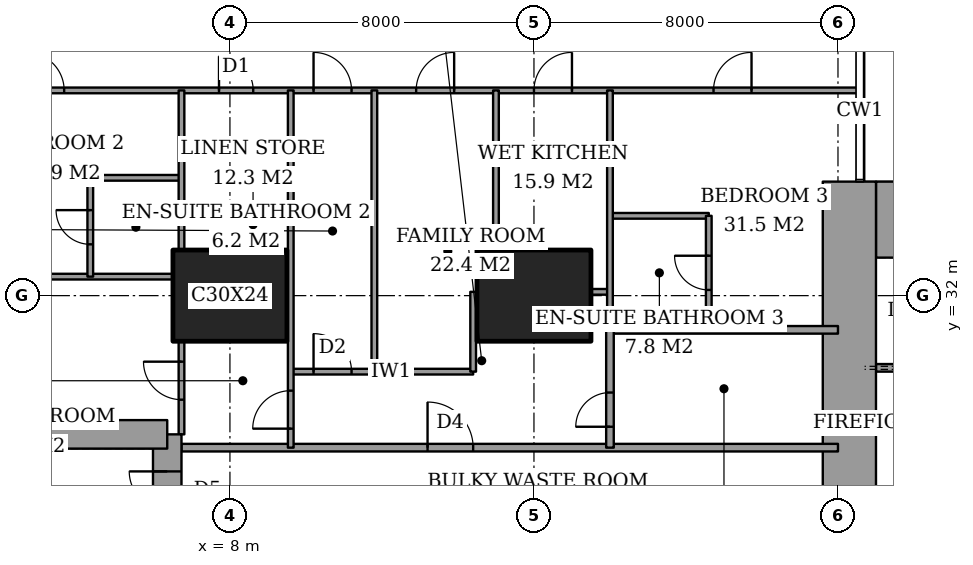
"""IFC4 building model, lengths in metres.
Left out: names, types, materials, properties, quantities, classifications, styles, units other than length and angle.
Written with IfcOpenShell. Run it as: python <this file> out.ifc"""

import sys

from ifc_helpers import new_model, si_unit, direction, frame, frame_2d, origin, origin_2d, place, context, subcontext, project, spatial, rectangle, extrude, element, fill, save


model = new_model("IFC4")
c1 = context("Model", 3, precision=1e-05, world=origin(), true_north=direction((0.0, 1.0)))
c2 = subcontext(c1, "Body", "Model", "MODEL_VIEW")
j1 = project(units=[si_unit("LENGTHUNIT", "METRE"), si_unit("PLANEANGLEUNIT", "RADIAN")], contexts=[c1])
p1 = place(None, origin())
s1 = spatial("IfcSite", under=j1, at=p1, CompositionType="ELEMENT")
p2 = place(p1, origin())
s2 = spatial("IfcBuilding", under=s1, at=p2, CompositionType="ELEMENT")
p3 = place(p2, frame((0.0, 0.0, 54.8)))
s3 = spatial("IfcBuildingStorey", under=s2, at=p3, CompositionType="ELEMENT", Elevation=54.8)
for number, where, z_axis, x_axis in (
    (1, (8.0, 32.0, 0.0), (0.0, 0.0, 1.0), (1.0, 0.0, 0.0)),
    (2, (16.0, 32.0, 0.0), (0.0, 0.0, 1.0), (1.0, 0.0, 0.0)),
):
    element("IfcColumn", number, at=place(p3, frame(where, z_axis=z_axis, x_axis=x_axis)), inside=s3, PredefinedType="COLUMN", context=c2, shape_type="SweptSolid", body=[
        extrude(rectangle(XDim=3.0, YDim=2.4, at=origin_2d()), origin(), (0.0, 0.0, 1.0), 3.6),
    ])
p4 = place(p3, frame((25.0, 34.0, 0.0), z_axis=(0.0, 0.0, 1.0), x_axis=(1.0, 0.0, 0.0)))
e3 = element("IfcWall", 3, at=p4, inside=s3, PredefinedType="SHEAR", context=c2, shape_type="SweptSolid", body=[
    extrude(rectangle(XDim=3.15, YDim=2.0, at=frame_2d((1.575, 0.0))), origin(), (0.0, 0.0, 1.0), 3.6),
])
p5 = place(p3, frame((24.3, 23.15, 0.0), z_axis=(0.0, 0.0, 1.0), x_axis=(0.0, 1.0, 0.0)))
e4 = element("IfcWall", 4, at=p5, inside=s3, PredefinedType="SHEAR", context=c2, shape_type="SweptSolid", body=[
    extrude(rectangle(XDim=11.85, YDim=1.4, at=frame_2d((5.925, 0.0))), origin(), (0.0, 0.0, 1.0), 3.6),
])
p6 = place(p5, frame((0.75, 0.0, 0.0)))
e5 = element("IfcOpeningElement", 5, at=p6, cuts=e4, PredefinedType="OPENING", context=c2, shape_type="SweptSolid", body=[
    extrude(rectangle(XDim=1.8, YDim=2.4, at=frame_2d((0.9, 1.2))), frame((0.0, 0.71, 0.0), z_axis=(0.0, -1.0, 0.0), x_axis=(1.0, 0.0, 0.0)), (0.0, 0.0, 1.0), 1.42),
])
p7 = place(p3, frame((6.35, 19.65, 0.0), z_axis=(0.0, 0.0, 1.0), x_axis=(0.0, 1.0, 0.0)))
e6 = element("IfcWall", 6, at=p7, inside=s3, PredefinedType="SHEAR", context=c2, shape_type="SweptSolid", body=[
    extrude(rectangle(XDim=8.7, YDim=0.75, at=frame_2d((4.35, 0.0))), origin(), (0.0, 0.0, 1.0), 3.6),
])
p8 = place(p7, frame((6.725, 0.0, 0.0)))
e7 = element("IfcOpeningElement", 7, at=p8, cuts=e6, PredefinedType="OPENING", context=c2, shape_type="SweptSolid", body=[
    extrude(rectangle(XDim=1.0, YDim=2.1, at=frame_2d((0.5, 1.05))), frame((0.0, 0.385, 0.0), z_axis=(0.0, -1.0, 0.0), x_axis=(1.0, 0.0, 0.0)), (0.0, 0.0, 1.0), 0.77),
])
p9 = place(p3, frame((6.35, 28.35, 0.0), z_axis=(0.0, 0.0, 1.0), x_axis=(-1.0, 0.0, 0.0)))
e8 = element("IfcWall", 8, at=p9, inside=s3, PredefinedType="SHEAR", context=c2, shape_type="SweptSolid", body=[
    extrude(rectangle(XDim=4.45, YDim=0.75, at=frame_2d((2.225, 0.0))), origin(), (0.0, 0.0, 1.0), 3.6),
])
p10 = place(p3, frame((6.725, 28.0, 0.0), z_axis=(0.0, 0.0, 1.0), x_axis=(1.0, 0.0, 0.0)))
e9 = element("IfcWall", 9, at=p10, inside=s3, PredefinedType="PARTITIONING", context=c2, shape_type="SweptSolid", body=[
    extrude(rectangle(XDim=17.275, YDim=0.2, at=frame_2d((8.637, 0.0))), origin(), (0.0, 0.0, 1.0), 3.35),
])
p11 = place(p10, frame((6.475, 0.0, 0.0)))
e10 = element("IfcOpeningElement", 10, at=p11, cuts=e9, PredefinedType="OPENING", context=c2, shape_type="SweptSolid", body=[
    extrude(rectangle(XDim=1.2, YDim=2.4, at=frame_2d((0.6, 1.2))), frame((0.0, 0.11, 0.0), z_axis=(0.0, -1.0, 0.0), x_axis=(1.0, 0.0, 0.0)), (0.0, 0.0, 1.0), 0.22),
])
p12 = place(p3, frame((9.6, 30.0, 0.0), z_axis=(0.0, 0.0, 1.0), x_axis=(1.0, 0.0, 0.0)))
e11 = element("IfcWall", 11, at=p12, inside=s3, PredefinedType="PARTITIONING", context=c2, shape_type="SweptSolid", body=[
    extrude(rectangle(XDim=4.8, YDim=0.15, at=frame_2d((2.4, 0.0))), origin(), (0.0, 0.0, 1.0), 3.35),
])
p13 = place(p12, frame((0.6, 0.0, 0.0)))
e12 = element("IfcOpeningElement", 12, at=p13, cuts=e11, PredefinedType="OPENING", context=c2, shape_type="SweptSolid", body=[
    extrude(rectangle(XDim=1.0, YDim=2.1, at=frame_2d((0.5, 1.05))), frame((0.0, 0.085, 0.0), z_axis=(0.0, -1.0, 0.0), x_axis=(1.0, 0.0, 0.0)), (0.0, 0.0, 1.0), 0.17),
])
p14 = place(p3, frame((18.0, 31.1, 0.0), z_axis=(0.0, 0.0, 1.0), x_axis=(1.0, 0.0, 0.0)))
e13 = element("IfcWall", 13, at=p14, inside=s3, PredefinedType="PARTITIONING", context=c2, shape_type="SweptSolid", body=[
    extrude(rectangle(XDim=6.0, YDim=0.2, at=frame_2d((3.0, 0.0))), origin(), (0.0, 0.0, 1.0), 3.35),
])
p15 = place(p3, frame((17.5, 32.1, 0.0), z_axis=(0.0, 0.0, 1.0), x_axis=(1.0, 0.0, 0.0)))
e14 = element("IfcWall", 14, at=p15, inside=s3, PredefinedType="PARTITIONING", context=c2, shape_type="SweptSolid", body=[
    extrude(rectangle(XDim=0.5, YDim=0.15, at=frame_2d((0.25, 0.0))), origin(), (0.0, 0.0, 1.0), 2.634),
])
p16 = place(p3, frame((1.35, 32.5, 0.0), z_axis=(0.0, 0.0, 1.0), x_axis=(1.0, 0.0, 0.0)))
e15 = element("IfcWall", 15, at=p16, inside=s3, PredefinedType="PARTITIONING", context=c2, shape_type="SweptSolid", body=[
    extrude(rectangle(XDim=5.15, YDim=0.15, at=frame_2d((2.575, 0.0))), origin(), (0.0, 0.0, 1.0), 3.35),
])
p17 = place(p3, frame((18.0, 34.1, 0.0), z_axis=(0.0, 0.0, 1.0), x_axis=(1.0, 0.0, 0.0)))
e16 = element("IfcWall", 16, at=p17, inside=s3, PredefinedType="PARTITIONING", context=c2, shape_type="SweptSolid", body=[
    extrude(rectangle(XDim=2.6, YDim=0.15, at=frame_2d((1.3, 0.0))), origin(), (0.0, 0.0, 1.0), 3.35),
])
p18 = place(p3, frame((4.325, 35.1, 0.0), z_axis=(0.0, 0.0, 1.0), x_axis=(1.0, 0.0, 0.0)))
e17 = element("IfcWall", 17, at=p18, inside=s3, PredefinedType="PARTITIONING", context=c2, shape_type="SweptSolid", body=[
    extrude(rectangle(XDim=2.4, YDim=0.15, at=frame_2d((1.2, 0.0))), origin(), (0.0, 0.0, 1.0), 3.35),
])
p19 = place(p3, frame((-0.45, 37.4, 0.0), z_axis=(0.0, 0.0, 1.0), x_axis=(1.0, 0.0, 0.0)))
e18 = element("IfcWall", 18, at=p19, inside=s3, PredefinedType="PARTITIONING", context=c2, shape_type="SweptSolid", body=[
    extrude(rectangle(XDim=25.011, YDim=0.15, at=frame_2d((12.505, 0.0))), origin(), (0.0, 0.0, 1.0), 3.35),
])
p20 = place(p19, frame((10.65, 0.0, 0.0)))
e19 = element("IfcOpeningElement", 19, at=p20, cuts=e18, PredefinedType="OPENING", context=c2, shape_type="SweptSolid", body=[
    extrude(rectangle(XDim=1.0, YDim=2.1, at=frame_2d((0.5, 1.05))), frame((0.0, 0.085, 0.0), z_axis=(0.0, -1.0, 0.0), x_axis=(1.0, 0.0, 0.0)), (0.0, 0.0, 1.0), 0.17),
])
p21 = place(p19, frame((3.087, 0.0, 0.0)))
e20 = element("IfcOpeningElement", 20, at=p21, cuts=e18, PredefinedType="OPENING", context=c2, shape_type="SweptSolid", body=[
    extrude(rectangle(XDim=1.0, YDim=2.1, at=frame_2d((0.5, 1.05))), frame((0.0, 0.085, 0.0), z_axis=(0.0, -1.0, 0.0), x_axis=(1.0, 0.0, 0.0)), (0.0, 0.0, 1.0), 0.17),
])
p22 = place(p19, frame((8.163, 0.0, 0.0)))
e21 = element("IfcOpeningElement", 21, at=p22, cuts=e18, PredefinedType="OPENING", context=c2, shape_type="SweptSolid", body=[
    extrude(rectangle(XDim=0.9, YDim=2.1, at=frame_2d((0.45, 1.05))), frame((0.0, 0.085, 0.0), z_axis=(0.0, -1.0, 0.0), x_axis=(1.0, 0.0, 0.0)), (0.0, 0.0, 1.0), 0.17),
])
p23 = place(p19, frame((13.35, 0.0, 0.0)))
e22 = element("IfcOpeningElement", 22, at=p23, cuts=e18, PredefinedType="OPENING", context=c2, shape_type="SweptSolid", body=[
    extrude(rectangle(XDim=1.0, YDim=2.1, at=frame_2d((0.5, 1.05))), frame((0.0, 0.085, 0.0), z_axis=(0.0, -1.0, 0.0), x_axis=(1.0, 0.0, 0.0)), (0.0, 0.0, 1.0), 0.17),
])
p24 = place(p19, frame((16.45, 0.0, 0.0)))
e23 = element("IfcOpeningElement", 23, at=p24, cuts=e18, PredefinedType="OPENING", context=c2, shape_type="SweptSolid", body=[
    extrude(rectangle(XDim=1.0, YDim=2.1, at=frame_2d((0.5, 1.05))), frame((0.0, 0.085, 0.0), z_axis=(0.0, -1.0, 0.0), x_axis=(1.0, 0.0, 0.0)), (0.0, 0.0, 1.0), 0.17),
])
p25 = place(p19, frame((21.175, 0.0, 0.0)))
e24 = element("IfcOpeningElement", 24, at=p25, cuts=e18, PredefinedType="OPENING", context=c2, shape_type="SweptSolid", body=[
    extrude(rectangle(XDim=1.0, YDim=2.1, at=frame_2d((0.5, 1.05))), frame((0.0, 0.085, 0.0), z_axis=(0.0, -1.0, 0.0), x_axis=(1.0, 0.0, 0.0)), (0.0, 0.0, 1.0), 0.17),
])
p26 = place(p3, frame((4.325, 32.5, 0.0), z_axis=(0.0, 0.0, 1.0), x_axis=(0.0, 1.0, 0.0)))
e25 = element("IfcWall", 25, at=p26, inside=s3, PredefinedType="PARTITIONING", context=c2, shape_type="SweptSolid", body=[
    extrude(rectangle(XDim=2.6, YDim=0.15, at=frame_2d((1.3, 0.0))), origin(), (0.0, 0.0, 1.0), 3.35),
])
p27 = place(p26, frame((0.85, 0.0, 0.0)))
e26 = element("IfcOpeningElement", 26, at=p27, cuts=e25, PredefinedType="OPENING", context=c2, shape_type="SweptSolid", body=[
    extrude(rectangle(XDim=0.9, YDim=2.1, at=frame_2d((0.45, 1.05))), frame((0.0, 0.085, 0.0), z_axis=(0.0, -1.0, 0.0), x_axis=(1.0, 0.0, 0.0)), (0.0, 0.0, 1.0), 0.17),
])
p28 = place(p3, frame((6.725, 28.35, 0.0), z_axis=(0.0, 0.0, 1.0), x_axis=(0.0, 1.0, 0.0)))
e27 = element("IfcWall", 27, at=p28, inside=s3, PredefinedType="PARTITIONING", context=c2, shape_type="SweptSolid", body=[
    extrude(rectangle(XDim=2.45, YDim=0.15, at=frame_2d((1.225, 0.0))), origin(), (0.0, 0.0, 1.0), 3.35),
])
p29 = place(p28, frame((0.913, 0.0, 0.0)))
e28 = element("IfcOpeningElement", 28, at=p29, cuts=e27, PredefinedType="OPENING", context=c2, shape_type="SweptSolid", body=[
    extrude(rectangle(XDim=1.0, YDim=2.1, at=frame_2d((0.5, 1.05))), frame((0.0, 0.085, 0.0), z_axis=(0.0, -1.0, 0.0), x_axis=(1.0, 0.0, 0.0)), (0.0, 0.0, 1.0), 0.17),
])
p30 = place(p3, frame((6.725, 33.2, 0.0), z_axis=(0.0, 0.0, 1.0), x_axis=(0.0, 1.0, 0.0)))
e29 = element("IfcWall", 29, at=p30, inside=s3, PredefinedType="PARTITIONING", context=c2, shape_type="SweptSolid", body=[
    extrude(rectangle(XDim=4.2, YDim=0.15, at=frame_2d((2.1, 0.0))), origin(), (0.0, 0.0, 1.0), 3.35),
])
p31 = place(p3, frame((9.6, 28.0, 0.0), z_axis=(0.0, 0.0, 1.0), x_axis=(0.0, 1.0, 0.0)))
e30 = element("IfcWall", 30, at=p31, inside=s3, PredefinedType="PARTITIONING", context=c2, shape_type="SweptSolid", body=[
    extrude(rectangle(XDim=9.4, YDim=0.15, at=frame_2d((4.7, 0.0))), origin(), (0.0, 0.0, 1.0), 3.35),
])
p32 = place(p31, frame((0.5, 0.0, 0.0)))
e31 = element("IfcOpeningElement", 31, at=p32, cuts=e30, PredefinedType="OPENING", context=c2, shape_type="SweptSolid", body=[
    extrude(rectangle(XDim=1.0, YDim=2.1, at=frame_2d((0.5, 1.05))), frame((0.0, 0.085, 0.0), z_axis=(0.0, -1.0, 0.0), x_axis=(1.0, 0.0, 0.0)), (0.0, 0.0, 1.0), 0.17),
])
p33 = place(p3, frame((11.8, 30.0, 0.0), z_axis=(0.0, 0.0, 1.0), x_axis=(0.0, 1.0, 0.0)))
e32 = element("IfcWall", 32, at=p33, inside=s3, PredefinedType="PARTITIONING", context=c2, shape_type="SweptSolid", body=[
    extrude(rectangle(XDim=7.4, YDim=0.15, at=frame_2d((3.7, 0.0))), origin(), (0.0, 0.0, 1.0), 3.35),
])
p34 = place(p3, frame((14.4, 30.0, 0.0), z_axis=(0.0, 0.0, 1.0), x_axis=(0.0, 1.0, 0.0)))
e33 = element("IfcWall", 33, at=p34, inside=s3, PredefinedType="PARTITIONING", context=c2, shape_type="SweptSolid", body=[
    extrude(rectangle(XDim=2.1, YDim=0.15, at=frame_2d((1.05, 0.0))), origin(), (0.0, 0.0, 1.0), 3.35),
])
p35 = place(p3, frame((15.0, 33.2, 0.0), z_axis=(0.0, 0.0, 1.0), x_axis=(0.0, 1.0, 0.0)))
e34 = element("IfcWall", 34, at=p35, inside=s3, PredefinedType="PARTITIONING", context=c2, shape_type="SweptSolid", body=[
    extrude(rectangle(XDim=4.2, YDim=0.15, at=frame_2d((2.1, 0.0))), origin(), (0.0, 0.0, 1.0), 3.35),
])
p36 = place(p3, frame((18.0, 28.0, 0.0), z_axis=(0.0, 0.0, 1.0), x_axis=(0.0, 1.0, 0.0)))
e35 = element("IfcWall", 35, at=p36, inside=s3, PredefinedType="PARTITIONING", context=c2, shape_type="SweptSolid", body=[
    extrude(rectangle(XDim=3.1, YDim=0.2, at=frame_2d((1.55, 0.0))), origin(), (0.0, 0.0, 1.0), 3.35),
])
p37 = place(p36, frame((0.55, 0.0, 0.0)))
e36 = element("IfcOpeningElement", 36, at=p37, cuts=e35, PredefinedType="OPENING", context=c2, shape_type="SweptSolid", body=[
    extrude(rectangle(XDim=0.9, YDim=2.1, at=frame_2d((0.45, 1.05))), frame((0.0, 0.11, 0.0), z_axis=(0.0, -1.0, 0.0), x_axis=(1.0, 0.0, 0.0)), (0.0, 0.0, 1.0), 0.22),
])
p38 = place(p3, frame((18.0, 31.1, 0.0), z_axis=(0.0, 0.0, 1.0), x_axis=(0.0, 1.0, 0.0)))
e37 = element("IfcWall", 37, at=p38, inside=s3, PredefinedType="PARTITIONING", context=c2, shape_type="SweptSolid", body=[
    extrude(rectangle(XDim=6.3, YDim=0.15, at=frame_2d((3.15, 0.0))), origin(), (0.0, 0.0, 1.0), 3.35),
])
p39 = place(p3, frame((20.6, 31.1, 0.0), z_axis=(0.0, 0.0, 1.0), x_axis=(0.0, 1.0, 0.0)))
e38 = element("IfcWall", 38, at=p39, inside=s3, PredefinedType="PARTITIONING", context=c2, shape_type="SweptSolid", body=[
    extrude(rectangle(XDim=3.0, YDim=0.15, at=frame_2d((1.5, 0.0))), origin(), (0.0, 0.0, 1.0), 3.35),
])
p40 = place(p39, frame((1.05, 0.0, 0.0)))
e39 = element("IfcOpeningElement", 39, at=p40, cuts=e38, PredefinedType="OPENING", context=c2, shape_type="SweptSolid", body=[
    extrude(rectangle(XDim=0.9, YDim=2.1, at=frame_2d((0.45, 1.05))), frame((0.0, 0.085, 0.0), z_axis=(0.0, -1.0, 0.0), x_axis=(1.0, 0.0, 0.0)), (0.0, 0.0, 1.0), 0.17),
])
p41 = place(p3, frame((25.0, 30.1, 0.0), z_axis=(0.0, 0.0, 1.0), x_axis=(1.0, 0.0, 0.0)))
e40 = element("IfcWall", 40, at=p41, inside=s3, PredefinedType="PARTITIONING", context=c2, shape_type="SweptSolid", body=[
    extrude(rectangle(XDim=12.7, YDim=0.2, at=frame_2d((6.35, 0.0))), origin(), (0.0, 0.0, 1.0), 3.6),
])
p42 = place(p41, frame((0.9, 0.0, 0.0)))
e41 = element("IfcOpeningElement", 41, at=p42, cuts=e40, PredefinedType="OPENING", context=c2, shape_type="SweptSolid", body=[
    extrude(rectangle(XDim=1.2, YDim=2.1, at=frame_2d((0.6, 1.05))), frame((0.0, 0.11, 0.0), z_axis=(0.0, -1.0, 0.0), x_axis=(1.0, 0.0, 0.0)), (0.0, 0.0, 1.0), 0.22),
])
p43 = place(p20, origin())
e42 = element("IfcDoor", 42, at=p43, inside=s3, OperationType="SINGLE_SWING_RIGHT", PredefinedType="DOOR", context=c2, shape_type="SweptSolid", body=[
    extrude(rectangle(XDim=1.0, YDim=2.1, at=frame_2d((0.5, 1.05))), frame((0.0, 0.025, 0.0), z_axis=(0.0, -1.0, 0.0), x_axis=(1.0, 0.0, 0.0)), (0.0, 0.0, 1.0), 0.05),
])
fill(e19, e42)
p44 = place(p27, origin())
e43 = element("IfcDoor", 43, at=p44, inside=s3, OperationType="SINGLE_SWING_LEFT", PredefinedType="DOOR", context=c2, shape_type="SweptSolid", body=[
    extrude(rectangle(XDim=0.9, YDim=2.1, at=frame_2d((0.45, 1.05))), frame((0.0, 0.025, 0.0), z_axis=(0.0, -1.0, 0.0), x_axis=(1.0, 0.0, 0.0)), (0.0, 0.0, 1.0), 0.05),
])
fill(e26, e43)
p45 = place(p21, origin())
e44 = element("IfcDoor", 44, at=p45, inside=s3, OperationType="SINGLE_SWING_RIGHT", PredefinedType="DOOR", context=c2, shape_type="SweptSolid", body=[
    extrude(rectangle(XDim=1.0, YDim=2.1, at=frame_2d((0.5, 1.05))), frame((0.0, 0.025, 0.0), z_axis=(0.0, -1.0, 0.0), x_axis=(1.0, 0.0, 0.0)), (0.0, 0.0, 1.0), 0.05),
])
fill(e20, e44)
p46 = place(p29, origin())
e45 = element("IfcDoor", 45, at=p46, inside=s3, OperationType="SINGLE_SWING_LEFT", PredefinedType="DOOR", context=c2, shape_type="SweptSolid", body=[
    extrude(rectangle(XDim=1.0, YDim=2.1, at=frame_2d((0.5, 1.05))), frame((0.0, 0.025, 0.0), z_axis=(0.0, -1.0, 0.0), x_axis=(1.0, 0.0, 0.0)), (0.0, 0.0, 1.0), 0.05),
])
fill(e28, e45)
p47 = place(p22, origin())
e46 = element("IfcDoor", 46, at=p47, inside=s3, OperationType="SINGLE_SWING_RIGHT", PredefinedType="DOOR", context=c2, shape_type="SweptSolid", body=[
    extrude(rectangle(XDim=0.9, YDim=2.1, at=frame_2d((0.45, 1.05))), frame((0.0, 0.025, 0.0), z_axis=(0.0, -1.0, 0.0), x_axis=(1.0, 0.0, 0.0)), (0.0, 0.0, 1.0), 0.05),
])
fill(e21, e46)
p48 = place(p32, origin())
e47 = element("IfcDoor", 47, at=p48, inside=s3, OperationType="SINGLE_SWING_RIGHT", PredefinedType="DOOR", context=c2, shape_type="SweptSolid", body=[
    extrude(rectangle(XDim=1.0, YDim=2.1, at=frame_2d((0.5, 1.05))), frame((0.0, 0.025, 0.0), z_axis=(0.0, -1.0, 0.0), x_axis=(1.0, 0.0, 0.0)), (0.0, 0.0, 1.0), 0.05),
])
fill(e31, e47)
p49 = place(p11, origin())
e48 = element("IfcDoor", 48, at=p49, inside=s3, OperationType="SINGLE_SWING_RIGHT", PredefinedType="DOOR", context=c2, shape_type="SweptSolid", body=[
    extrude(rectangle(XDim=1.2, YDim=2.4, at=frame_2d((0.6, 1.2))), frame((0.0, 0.025, 0.0), z_axis=(0.0, -1.0, 0.0), x_axis=(1.0, 0.0, 0.0)), (0.0, 0.0, 1.0), 0.05),
])
fill(e10, e48)
p50 = place(p13, origin())
e49 = element("IfcDoor", 49, at=p50, inside=s3, OperationType="SINGLE_SWING_RIGHT", PredefinedType="DOOR", context=c2, shape_type="SweptSolid", body=[
    extrude(rectangle(XDim=1.0, YDim=2.1, at=frame_2d((0.5, 1.05))), frame((0.0, 0.025, 0.0), z_axis=(0.0, -1.0, 0.0), x_axis=(1.0, 0.0, 0.0)), (0.0, 0.0, 1.0), 0.05),
])
fill(e12, e49)
p51 = place(p23, origin())
e50 = element("IfcDoor", 50, at=p51, inside=s3, OperationType="SINGLE_SWING_LEFT", PredefinedType="DOOR", context=c2, shape_type="SweptSolid", body=[
    extrude(rectangle(XDim=1.0, YDim=2.1, at=frame_2d((0.5, 1.05))), frame((0.0, 0.025, 0.0), z_axis=(0.0, -1.0, 0.0), x_axis=(1.0, 0.0, 0.0)), (0.0, 0.0, 1.0), 0.05),
])
fill(e22, e50)
p52 = place(p24, origin())
e51 = element("IfcDoor", 51, at=p52, inside=s3, OperationType="SINGLE_SWING_LEFT", PredefinedType="DOOR", context=c2, shape_type="SweptSolid", body=[
    extrude(rectangle(XDim=1.0, YDim=2.1, at=frame_2d((0.5, 1.05))), frame((0.0, 0.025, 0.0), z_axis=(0.0, -1.0, 0.0), x_axis=(1.0, 0.0, 0.0)), (0.0, 0.0, 1.0), 0.05),
])
fill(e23, e51)
p53 = place(p40, origin())
e52 = element("IfcDoor", 52, at=p53, inside=s3, OperationType="SINGLE_SWING_LEFT", PredefinedType="DOOR", context=c2, shape_type="SweptSolid", body=[
    extrude(rectangle(XDim=0.9, YDim=2.1, at=frame_2d((0.45, 1.05))), frame((0.0, 0.025, 0.0), z_axis=(0.0, -1.0, 0.0), x_axis=(1.0, 0.0, 0.0)), (0.0, 0.0, 1.0), 0.05),
])
fill(e39, e52)
p54 = place(p25, origin())
e53 = element("IfcDoor", 53, at=p54, inside=s3, OperationType="SINGLE_SWING_LEFT", PredefinedType="DOOR", context=c2, shape_type="SweptSolid", body=[
    extrude(rectangle(XDim=1.0, YDim=2.1, at=frame_2d((0.5, 1.05))), frame((0.0, 0.025, 0.0), z_axis=(0.0, -1.0, 0.0), x_axis=(1.0, 0.0, 0.0)), (0.0, 0.0, 1.0), 0.05),
])
fill(e24, e53)
p55 = place(p37, origin())
e54 = element("IfcDoor", 54, at=p55, inside=s3, OperationType="SINGLE_SWING_RIGHT", PredefinedType="DOOR", context=c2, shape_type="SweptSolid", body=[
    extrude(rectangle(XDim=0.9, YDim=2.1, at=frame_2d((0.45, 1.05))), frame((0.0, 0.025, 0.0), z_axis=(0.0, -1.0, 0.0), x_axis=(1.0, 0.0, 0.0)), (0.0, 0.0, 1.0), 0.05),
])
fill(e36, e54)
p56 = place(p8, origin())
e55 = element("IfcDoor", 55, at=p56, inside=s3, OperationType="SINGLE_SWING_LEFT", PredefinedType="DOOR", context=c2, shape_type="SweptSolid", body=[
    extrude(rectangle(XDim=1.0, YDim=2.1, at=frame_2d((0.5, 1.05))), frame((0.0, 0.025, 0.0), z_axis=(0.0, -1.0, 0.0), x_axis=(1.0, 0.0, 0.0)), (0.0, 0.0, 1.0), 0.05),
])
fill(e7, e55)
save(model, sys.argv[1])
